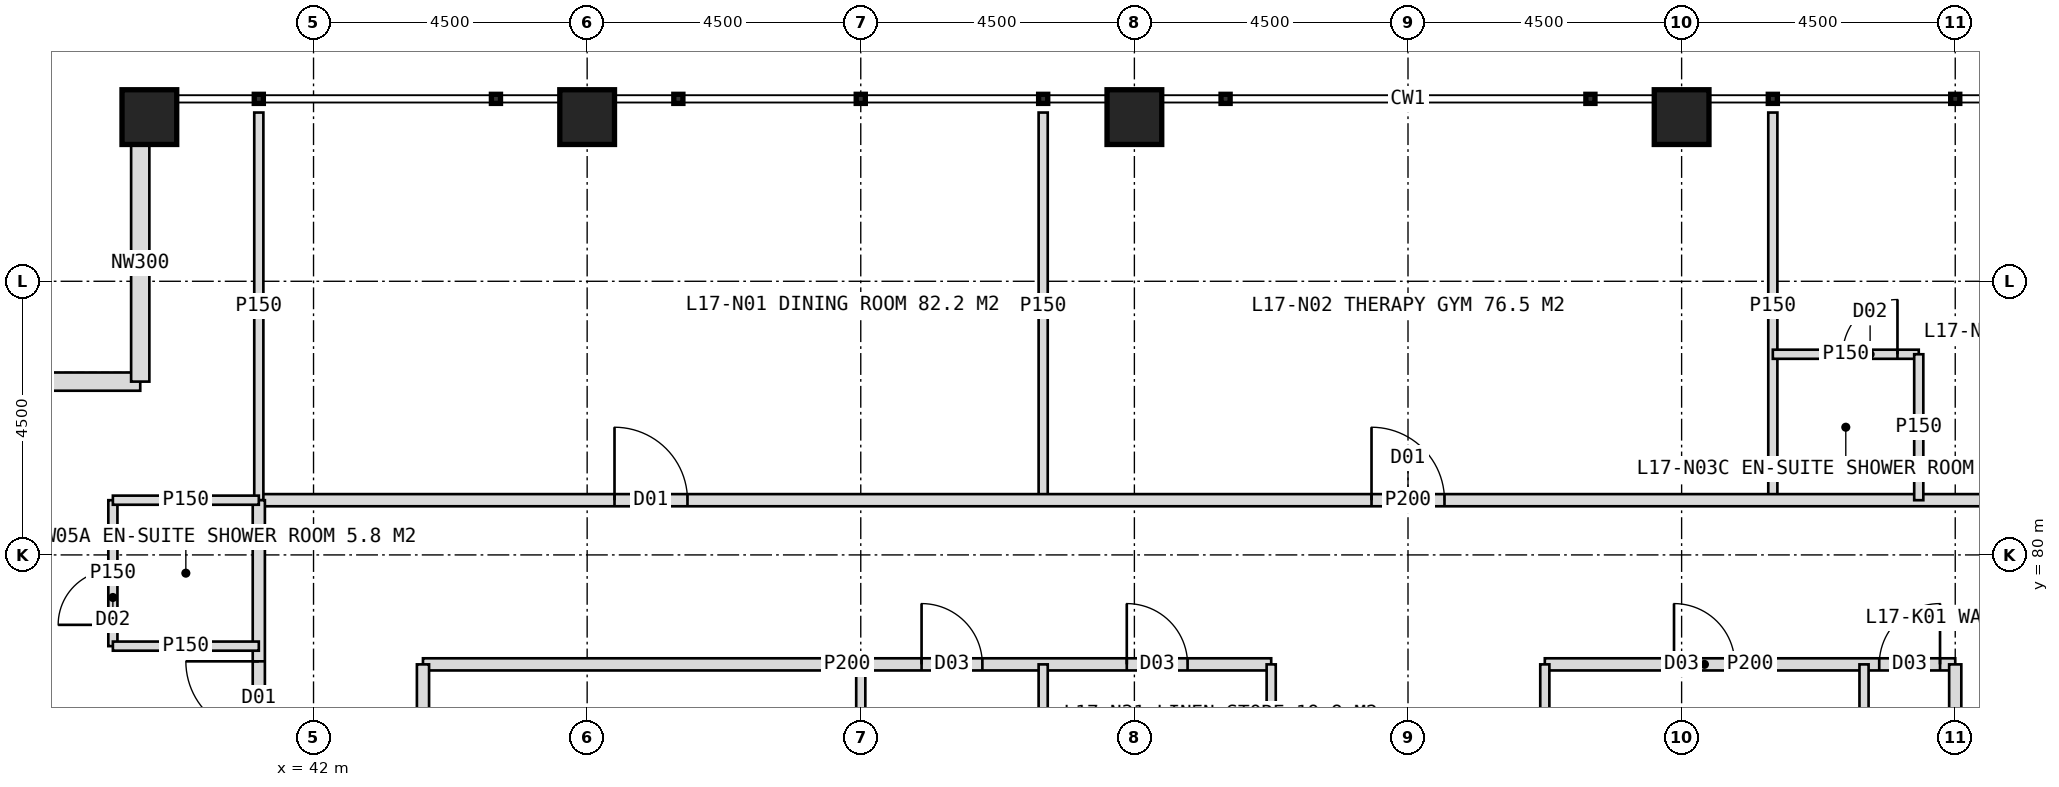
"""IFC4 building model, lengths in metres.
Left out: names, types, materials, properties, quantities, classifications, styles, units other than length and angle.
Written with IfcOpenShell. Run it as: python <this file> out.ifc"""

import sys

from ifc_helpers import new_model, si_unit, direction, frame, frame_2d, origin, origin_2d, place, context, subcontext, project, spatial, rectangle, hollow_rectangle, extrude, element, fill, save


model = new_model("IFC4")
c1 = context("Model", 3, precision=1e-05, world=origin(), true_north=direction((0.0, 1.0)))
c2 = subcontext(c1, "Body", "Model", "MODEL_VIEW")
j1 = project(units=[si_unit("LENGTHUNIT", "METRE"), si_unit("PLANEANGLEUNIT", "RADIAN")], contexts=[c1])
p1 = place(None, origin())
s1 = spatial("IfcSite", under=j1, at=p1, CompositionType="ELEMENT")
p2 = place(p1, origin())
s2 = spatial("IfcBuilding", under=s1, at=p2, CompositionType="ELEMENT")
p3 = place(p2, frame((0.0, 0.0, 75.0)))
s3 = spatial("IfcBuildingStorey", under=s2, at=p3, CompositionType="ELEMENT", Elevation=75.0)
for number, where, z_axis, x_axis in (
    (1, (39.3, 87.2, 0.0), (0.0, 0.0, 1.0), (1.0, 0.0, 0.0)),
    (2, (46.5, 87.2, 0.0), (0.0, 0.0, 1.0), (1.0, 0.0, 0.0)),
    (3, (55.5, 87.2, 0.0), (0.0, 0.0, 1.0), (1.0, 0.0, 0.0)),
    (4, (64.5, 87.2, 0.0), (0.0, 0.0, 1.0), (1.0, 0.0, 0.0)),
):
    element("IfcColumn", number, at=place(p3, frame(where, z_axis=z_axis, x_axis=x_axis)), inside=s3, PredefinedType="COLUMN", context=c2, shape_type="SweptSolid", body=[
        extrude(hollow_rectangle(XDim=0.9, YDim=0.9, WallThickness=0.08, at=origin_2d()), origin(), (0.0, 0.0, 1.0), 4.0),
    ])
for number, where, z_axis, x_axis in (
    (5, (35.25, 82.85, 0.0), (0.0, 0.0, 1.0), (1.0, 0.0, 0.0)),
    (6, (39.15, 82.85, 0.0), (0.0, 0.0, 1.0), (0.0, 1.0, 0.0)),
):
    element("IfcWall", number, at=place(p3, frame(where, z_axis=z_axis, x_axis=x_axis)), inside=s3, PredefinedType="ELEMENTEDWALL", context=c2, shape_type="SweptSolid", body=[
        extrude(rectangle(XDim=3.9, YDim=0.3, at=frame_2d((1.95, 0.0))), origin(), (0.0, 0.0, 1.0), 2.95),
    ])
for number, where, z_axis, x_axis in (
    (7, (54.0, 80.9, 0.0), (0.0, 0.0, 1.0), (0.0, 1.0, 0.0)),
    (8, (66.0, 80.9, 0.0), (0.0, 0.0, 1.0), (0.0, 1.0, 0.0)),
):
    element("IfcWall", number, at=place(p3, frame(where, z_axis=z_axis, x_axis=x_axis)), inside=s3, PredefinedType="PARTITIONING", context=c2, shape_type="SweptSolid", body=[
        extrude(rectangle(XDim=6.375, YDim=0.15, at=frame_2d((3.188, 0.0))), origin(), (0.0, 0.0, 1.0), 3.75),
    ])
p4 = place(p3, frame((41.1, 80.9, 0.0), z_axis=(0.0, 0.0, 1.0), x_axis=(1.0, 0.0, 0.0)))
e9 = element("IfcWall", 9, at=p4, inside=s3, PredefinedType="PARTITIONING", context=c2, shape_type="SweptSolid", body=[
    extrude(rectangle(XDim=37.8, YDim=0.2, at=frame_2d((18.9, 0.0))), origin(), (0.0, 0.0, 1.0), 3.75),
])
p5 = place(p4, frame((5.85, 0.0, 0.0)))
e10 = element("IfcOpeningElement", 10, at=p5, cuts=e9, PredefinedType="OPENING", context=c2, shape_type="SweptSolid", body=[
    extrude(rectangle(XDim=1.2, YDim=2.2, at=frame_2d((0.6, 1.1))), frame((0.0, 0.11, 0.0), z_axis=(0.0, -1.0, 0.0), x_axis=(1.0, 0.0, 0.0)), (0.0, 0.0, 1.0), 0.22),
])
p6 = place(p4, frame((18.3, 0.0, 0.0)))
e11 = element("IfcOpeningElement", 11, at=p6, cuts=e9, PredefinedType="OPENING", context=c2, shape_type="SweptSolid", body=[
    extrude(rectangle(XDim=1.2, YDim=2.2, at=frame_2d((0.6, 1.1))), frame((0.0, 0.11, 0.0), z_axis=(0.0, -1.0, 0.0), x_axis=(1.0, 0.0, 0.0)), (0.0, 0.0, 1.0), 0.22),
])
p7 = place(p4, frame((33.95, 0.0, 0.0)))
e12 = element("IfcOpeningElement", 12, at=p7, cuts=e9, PredefinedType="OPENING", context=c2, shape_type="SweptSolid", body=[
    extrude(rectangle(XDim=1.2, YDim=2.2, at=frame_2d((0.6, 1.1))), frame((0.0, 0.11, 0.0), z_axis=(0.0, -1.0, 0.0), x_axis=(1.0, 0.0, 0.0)), (0.0, 0.0, 1.0), 0.22),
])
p8 = place(p3, frame((41.1, 80.9, 0.0), z_axis=(0.0, 0.0, 1.0), x_axis=(0.0, 1.0, 0.0)))
e13 = element("IfcWall", 13, at=p8, inside=s3, PredefinedType="PARTITIONING", context=c2, shape_type="SweptSolid", body=[
    extrude(rectangle(XDim=6.375, YDim=0.15, at=frame_2d((3.188, 0.0))), origin(), (0.0, 0.0, 1.0), 3.75),
])
p9 = place(p3, frame((66.0, 83.3, 0.0), z_axis=(0.0, 0.0, 1.0), x_axis=(1.0, 0.0, 0.0)))
e14 = element("IfcWall", 14, at=p9, inside=s3, PredefinedType="PARTITIONING", context=c2, shape_type="SweptSolid", body=[
    extrude(rectangle(XDim=2.4, YDim=0.15, at=frame_2d((1.2, 0.0))), origin(), (0.0, 0.0, 1.0), 3.75),
])
p10 = place(p9, frame((1.15, 0.0, 0.0)))
e15 = element("IfcOpeningElement", 15, at=p10, cuts=e14, PredefinedType="OPENING", context=c2, shape_type="SweptSolid", body=[
    extrude(rectangle(XDim=0.9, YDim=2.1, at=frame_2d((0.45, 1.05))), frame((0.0, 0.085, 0.0), z_axis=(0.0, -1.0, 0.0), x_axis=(1.0, 0.0, 0.0)), (0.0, 0.0, 1.0), 0.17),
])
p11 = place(p3, frame((68.4, 80.9, 0.0), z_axis=(0.0, 0.0, 1.0), x_axis=(0.0, 1.0, 0.0)))
e16 = element("IfcWall", 16, at=p11, inside=s3, PredefinedType="PARTITIONING", context=c2, shape_type="SweptSolid", body=[
    extrude(rectangle(XDim=2.4, YDim=0.15, at=frame_2d((1.2, 0.0))), origin(), (0.0, 0.0, 1.0), 3.75),
])
p12 = place(p3, frame((51.0, 71.0, 0.0), z_axis=(0.0, 0.0, 1.0), x_axis=(0.0, 1.0, 0.0)))
e17 = element("IfcWall", 17, at=p12, inside=s3, PredefinedType="PARTITIONING", context=c2, shape_type="SweptSolid", body=[
    extrude(rectangle(XDim=7.2, YDim=0.15, at=frame_2d((3.6, 0.0))), origin(), (0.0, 0.0, 1.0), 3.75),
])
p13 = place(p3, frame((43.8, 78.2, 0.0), z_axis=(0.0, 0.0, 1.0), x_axis=(1.0, 0.0, 0.0)))
e18 = element("IfcWall", 18, at=p13, inside=s3, PredefinedType="PARTITIONING", context=c2, shape_type="SweptSolid", body=[
    extrude(rectangle(XDim=13.95, YDim=0.2, at=frame_2d((6.975, 0.0))), origin(), (0.0, 0.0, 1.0), 3.75),
])
p14 = place(p13, frame((8.2, 0.0, 0.0)))
e19 = element("IfcOpeningElement", 19, at=p14, cuts=e18, PredefinedType="OPENING", context=c2, shape_type="SweptSolid", body=[
    extrude(rectangle(XDim=1.0, YDim=2.1, at=frame_2d((0.5, 1.05))), frame((0.0, 0.11, 0.0), z_axis=(0.0, -1.0, 0.0), x_axis=(1.0, 0.0, 0.0)), (0.0, 0.0, 1.0), 0.22),
])
p15 = place(p13, frame((11.575, 0.0, 0.0)))
e20 = element("IfcOpeningElement", 20, at=p15, cuts=e18, PredefinedType="OPENING", context=c2, shape_type="SweptSolid", body=[
    extrude(rectangle(XDim=1.0, YDim=2.1, at=frame_2d((0.5, 1.05))), frame((0.0, 0.11, 0.0), z_axis=(0.0, -1.0, 0.0), x_axis=(1.0, 0.0, 0.0)), (0.0, 0.0, 1.0), 0.22),
])
p16 = place(p3, frame((62.25, 78.2, 0.0), z_axis=(0.0, 0.0, 1.0), x_axis=(1.0, 0.0, 0.0)))
e21 = element("IfcWall", 21, at=p16, inside=s3, PredefinedType="PARTITIONING", context=c2, shape_type="SweptSolid", body=[
    extrude(rectangle(XDim=6.75, YDim=0.2, at=frame_2d((3.375, 0.0))), origin(), (0.0, 0.0, 1.0), 3.75),
])
p17 = place(p16, frame((2.125, 0.0, 0.0)))
e22 = element("IfcOpeningElement", 22, at=p17, cuts=e21, PredefinedType="OPENING", context=c2, shape_type="SweptSolid", body=[
    extrude(rectangle(XDim=1.0, YDim=2.1, at=frame_2d((0.5, 1.05))), frame((0.0, 0.11, 0.0), z_axis=(0.0, -1.0, 0.0), x_axis=(1.0, 0.0, 0.0)), (0.0, 0.0, 1.0), 0.22),
])
p18 = place(p16, frame((5.5, 0.0, 0.0)))
e23 = element("IfcOpeningElement", 23, at=p18, cuts=e21, PredefinedType="OPENING", context=c2, shape_type="SweptSolid", body=[
    extrude(rectangle(XDim=1.0, YDim=2.1, at=frame_2d((0.5, 1.05))), frame((0.0, 0.11, 0.0), z_axis=(0.0, -1.0, 0.0), x_axis=(1.0, 0.0, 0.0)), (0.0, 0.0, 1.0), 0.22),
])
p19 = place(p3, frame((57.75, 71.0, 0.0), z_axis=(0.0, 0.0, 1.0), x_axis=(0.0, 1.0, 0.0)))
e24 = element("IfcWall", 24, at=p19, inside=s3, PredefinedType="PARTITIONING", context=c2, shape_type="SweptSolid", body=[
    extrude(rectangle(XDim=7.2, YDim=0.15, at=frame_2d((3.6, 0.0))), origin(), (0.0, 0.0, 1.0), 3.75),
])
p20 = place(p19, frame((0.6, 0.0, 0.0)))
e25 = element("IfcOpeningElement", 25, at=p20, cuts=e24, PredefinedType="OPENING", context=c2, shape_type="SweptSolid", body=[
    extrude(rectangle(XDim=0.9, YDim=2.1, at=frame_2d((0.45, 1.05))), frame((0.0, 0.085, 0.0), z_axis=(0.0, -1.0, 0.0), x_axis=(1.0, 0.0, 0.0)), (0.0, 0.0, 1.0), 0.17),
])
p21 = place(p3, frame((62.25, 71.0, 0.0), z_axis=(0.0, 0.0, 1.0), x_axis=(0.0, 1.0, 0.0)))
e26 = element("IfcWall", 26, at=p21, inside=s3, PredefinedType="PARTITIONING", context=c2, shape_type="SweptSolid", body=[
    extrude(rectangle(XDim=7.2, YDim=0.15, at=frame_2d((3.6, 0.0))), origin(), (0.0, 0.0, 1.0), 3.75),
])
p22 = place(p21, frame((0.6, 0.0, 0.0)))
e27 = element("IfcOpeningElement", 27, at=p22, cuts=e26, PredefinedType="OPENING", context=c2, shape_type="SweptSolid", body=[
    extrude(rectangle(XDim=0.9, YDim=2.1, at=frame_2d((0.45, 1.05))), frame((0.0, 0.085, 0.0), z_axis=(0.0, -1.0, 0.0), x_axis=(1.0, 0.0, 0.0)), (0.0, 0.0, 1.0), 0.17),
])
for number, where, z_axis, x_axis in (
    (28, (54.0, 71.0, 0.0), (0.0, 0.0, 1.0), (0.0, 1.0, 0.0)),
    (29, (67.5, 71.0, 0.0), (0.0, 0.0, 1.0), (0.0, 1.0, 0.0)),
):
    element("IfcWall", number, at=place(p3, frame(where, z_axis=z_axis, x_axis=x_axis)), inside=s3, PredefinedType="PARTITIONING", context=c2, shape_type="SweptSolid", body=[
        extrude(rectangle(XDim=7.2, YDim=0.15, at=frame_2d((3.6, 0.0))), origin(), (0.0, 0.0, 1.0), 3.75),
    ])
p23 = place(p3, frame((41.1, 43.1, 0.0), z_axis=(0.0, 0.0, 1.0), x_axis=(0.0, 1.0, 0.0)))
e30 = element("IfcWall", 30, at=p23, inside=s3, PredefinedType="PARTITIONING", context=c2, shape_type="SweptSolid", body=[
    extrude(rectangle(XDim=37.8, YDim=0.2, at=frame_2d((18.9, 0.0))), origin(), (0.0, 0.0, 1.0), 3.75),
])
p24 = place(p23, frame((2.45, 0.0, 0.0)))
e31 = element("IfcOpeningElement", 31, at=p24, cuts=e30, PredefinedType="OPENING", context=c2, shape_type="SweptSolid", body=[
    extrude(rectangle(XDim=1.2, YDim=2.2, at=frame_2d((0.6, 1.1))), frame((0.0, 0.11, 0.0), z_axis=(0.0, -1.0, 0.0), x_axis=(1.0, 0.0, 0.0)), (0.0, 0.0, 1.0), 0.22),
])
p25 = place(p23, frame((9.55, 0.0, 0.0)))
e32 = element("IfcOpeningElement", 32, at=p25, cuts=e30, PredefinedType="OPENING", context=c2, shape_type="SweptSolid", body=[
    extrude(rectangle(XDim=1.2, YDim=2.2, at=frame_2d((0.6, 1.1))), frame((0.0, 0.11, 0.0), z_axis=(0.0, -1.0, 0.0), x_axis=(1.0, 0.0, 0.0)), (0.0, 0.0, 1.0), 0.22),
])
p26 = place(p23, frame((15.05, 0.0, 0.0)))
e33 = element("IfcOpeningElement", 33, at=p26, cuts=e30, PredefinedType="OPENING", context=c2, shape_type="SweptSolid", body=[
    extrude(rectangle(XDim=1.2, YDim=2.2, at=frame_2d((0.6, 1.1))), frame((0.0, 0.11, 0.0), z_axis=(0.0, -1.0, 0.0), x_axis=(1.0, 0.0, 0.0)), (0.0, 0.0, 1.0), 0.22),
])
p27 = place(p23, frame((21.55, 0.0, 0.0)))
e34 = element("IfcOpeningElement", 34, at=p27, cuts=e30, PredefinedType="OPENING", context=c2, shape_type="SweptSolid", body=[
    extrude(rectangle(XDim=1.2, YDim=2.2, at=frame_2d((0.6, 1.1))), frame((0.0, 0.11, 0.0), z_axis=(0.0, -1.0, 0.0), x_axis=(1.0, 0.0, 0.0)), (0.0, 0.0, 1.0), 0.22),
])
p28 = place(p23, frame((33.95, 0.0, 0.0)))
e35 = element("IfcOpeningElement", 35, at=p28, cuts=e30, PredefinedType="OPENING", context=c2, shape_type="SweptSolid", body=[
    extrude(rectangle(XDim=1.2, YDim=2.2, at=frame_2d((0.6, 1.1))), frame((0.0, 0.11, 0.0), z_axis=(0.0, -1.0, 0.0), x_axis=(1.0, 0.0, 0.0)), (0.0, 0.0, 1.0), 0.22),
])
p29 = place(p3, frame((38.7, 78.5, 0.0), z_axis=(0.0, 0.0, 1.0), x_axis=(0.0, 1.0, 0.0)))
e36 = element("IfcWall", 36, at=p29, inside=s3, PredefinedType="PARTITIONING", context=c2, shape_type="SweptSolid", body=[
    extrude(rectangle(XDim=2.4, YDim=0.15, at=frame_2d((1.2, 0.0))), origin(), (0.0, 0.0, 1.0), 3.75),
])
p30 = place(p29, frame((0.35, 0.0, 0.0)))
e37 = element("IfcOpeningElement", 37, at=p30, cuts=e36, PredefinedType="OPENING", context=c2, shape_type="SweptSolid", body=[
    extrude(rectangle(XDim=0.9, YDim=2.1, at=frame_2d((0.45, 1.05))), frame((0.0, 0.085, 0.0), z_axis=(0.0, -1.0, 0.0), x_axis=(1.0, 0.0, 0.0)), (0.0, 0.0, 1.0), 0.17),
])
for number, where, z_axis, x_axis in (
    (38, (41.1, 78.5, 0.0), (0.0, 0.0, 1.0), (-1.0, 0.0, 0.0)),
    (39, (41.1, 80.9, 0.0), (0.0, 0.0, 1.0), (-1.0, 0.0, 0.0)),
):
    element("IfcWall", number, at=place(p3, frame(where, z_axis=z_axis, x_axis=x_axis)), inside=s3, PredefinedType="PARTITIONING", context=c2, shape_type="SweptSolid", body=[
        extrude(rectangle(XDim=2.4, YDim=0.15, at=frame_2d((1.2, 0.0))), origin(), (0.0, 0.0, 1.0), 3.75),
    ])
p31 = place(p3, frame((43.8, 62.0, 0.0), z_axis=(0.0, 0.0, 1.0), x_axis=(0.0, 1.0, 0.0)))
e40 = element("IfcWall", 40, at=p31, inside=s3, PredefinedType="PARTITIONING", context=c2, shape_type="SweptSolid", body=[
    extrude(rectangle(XDim=16.2, YDim=0.2, at=frame_2d((8.1, 0.0))), origin(), (0.0, 0.0, 1.0), 3.75),
])
p32 = place(p31, frame((3.25, 0.0, 0.0)))
e41 = element("IfcOpeningElement", 41, at=p32, cuts=e40, PredefinedType="OPENING", context=c2, shape_type="SweptSolid", body=[
    extrude(rectangle(XDim=1.0, YDim=2.1, at=frame_2d((0.5, 1.05))), frame((0.0, 0.11, 0.0), z_axis=(0.0, -1.0, 0.0), x_axis=(1.0, 0.0, 0.0)), (0.0, 0.0, 1.0), 0.22),
])
p33 = place(p31, frame((9.25, 0.0, 0.0)))
e42 = element("IfcOpeningElement", 42, at=p33, cuts=e40, PredefinedType="OPENING", context=c2, shape_type="SweptSolid", body=[
    extrude(rectangle(XDim=1.0, YDim=2.1, at=frame_2d((0.5, 1.05))), frame((0.0, 0.11, 0.0), z_axis=(0.0, -1.0, 0.0), x_axis=(1.0, 0.0, 0.0)), (0.0, 0.0, 1.0), 0.22),
])
p34 = place(p31, frame((13.6, 0.0, 0.0)))
e43 = element("IfcOpeningElement", 43, at=p34, cuts=e40, PredefinedType="OPENING", context=c2, shape_type="SweptSolid", body=[
    extrude(rectangle(XDim=1.0, YDim=2.1, at=frame_2d((0.5, 1.05))), frame((0.0, 0.11, 0.0), z_axis=(0.0, -1.0, 0.0), x_axis=(1.0, 0.0, 0.0)), (0.0, 0.0, 1.0), 0.22),
])
p35 = place(p3, frame((69.0, 75.1, 0.0), z_axis=(0.0, 0.0, 1.0), x_axis=(0.0, 1.0, 0.0)))
e44 = element("IfcWall", 44, at=p35, inside=s3, PredefinedType="PARTITIONING", context=c2, shape_type="SweptSolid", body=[
    extrude(rectangle(XDim=3.1, YDim=0.2, at=frame_2d((1.55, 0.0))), origin(), (0.0, 0.0, 1.0), 3.75),
])
p36 = place(p5, origin())
e45 = element("IfcDoor", 45, at=p36, inside=s3, OperationType="SINGLE_SWING_LEFT", PredefinedType="DOOR", context=c2, shape_type="SweptSolid", body=[
    extrude(rectangle(XDim=1.2, YDim=2.2, at=frame_2d((0.6, 1.1))), frame((0.0, 0.025, 0.0), z_axis=(0.0, -1.0, 0.0), x_axis=(1.0, 0.0, 0.0)), (0.0, 0.0, 1.0), 0.05),
])
fill(e10, e45)
p37 = place(p6, origin())
e46 = element("IfcDoor", 46, at=p37, inside=s3, OperationType="SINGLE_SWING_LEFT", PredefinedType="DOOR", context=c2, shape_type="SweptSolid", body=[
    extrude(rectangle(XDim=1.2, YDim=2.2, at=frame_2d((0.6, 1.1))), frame((0.0, 0.025, 0.0), z_axis=(0.0, -1.0, 0.0), x_axis=(1.0, 0.0, 0.0)), (0.0, 0.0, 1.0), 0.05),
])
fill(e11, e46)
p38 = place(p10, origin())
e47 = element("IfcDoor", 47, at=p38, inside=s3, OperationType="SINGLE_SWING_RIGHT", PredefinedType="DOOR", context=c2, shape_type="SweptSolid", body=[
    extrude(rectangle(XDim=0.9, YDim=2.1, at=frame_2d((0.45, 1.05))), frame((0.0, 0.025, 0.0), z_axis=(0.0, -1.0, 0.0), x_axis=(1.0, 0.0, 0.0)), (0.0, 0.0, 1.0), 0.05),
])
fill(e15, e47)
p39 = place(p14, origin())
e48 = element("IfcDoor", 48, at=p39, inside=s3, OperationType="SINGLE_SWING_LEFT", PredefinedType="DOOR", context=c2, shape_type="SweptSolid", body=[
    extrude(rectangle(XDim=1.0, YDim=2.1, at=frame_2d((0.5, 1.05))), frame((0.0, 0.025, 0.0), z_axis=(0.0, -1.0, 0.0), x_axis=(1.0, 0.0, 0.0)), (0.0, 0.0, 1.0), 0.05),
])
fill(e19, e48)
p40 = place(p15, origin())
e49 = element("IfcDoor", 49, at=p40, inside=s3, OperationType="SINGLE_SWING_LEFT", PredefinedType="DOOR", context=c2, shape_type="SweptSolid", body=[
    extrude(rectangle(XDim=1.0, YDim=2.1, at=frame_2d((0.5, 1.05))), frame((0.0, 0.025, 0.0), z_axis=(0.0, -1.0, 0.0), x_axis=(1.0, 0.0, 0.0)), (0.0, 0.0, 1.0), 0.05),
])
fill(e20, e49)
p41 = place(p17, origin())
e50 = element("IfcDoor", 50, at=p41, inside=s3, OperationType="SINGLE_SWING_LEFT", PredefinedType="DOOR", context=c2, shape_type="SweptSolid", body=[
    extrude(rectangle(XDim=1.0, YDim=2.1, at=frame_2d((0.5, 1.05))), frame((0.0, 0.025, 0.0), z_axis=(0.0, -1.0, 0.0), x_axis=(1.0, 0.0, 0.0)), (0.0, 0.0, 1.0), 0.05),
])
fill(e22, e50)
p42 = place(p18, origin())
e51 = element("IfcDoor", 51, at=p42, inside=s3, OperationType="SINGLE_SWING_RIGHT", PredefinedType="DOOR", context=c2, shape_type="SweptSolid", body=[
    extrude(rectangle(XDim=1.0, YDim=2.1, at=frame_2d((0.5, 1.05))), frame((0.0, 0.025, 0.0), z_axis=(0.0, -1.0, 0.0), x_axis=(1.0, 0.0, 0.0)), (0.0, 0.0, 1.0), 0.05),
])
fill(e23, e51)
p43 = place(p28, origin())
e52 = element("IfcDoor", 52, at=p43, inside=s3, OperationType="SINGLE_SWING_RIGHT", PredefinedType="DOOR", context=c2, shape_type="SweptSolid", body=[
    extrude(rectangle(XDim=1.2, YDim=2.2, at=frame_2d((0.6, 1.1))), frame((0.0, 0.025, 0.0), z_axis=(0.0, -1.0, 0.0), x_axis=(1.0, 0.0, 0.0)), (0.0, 0.0, 1.0), 0.05),
])
fill(e35, e52)
p44 = place(p30, origin())
e53 = element("IfcDoor", 53, at=p44, inside=s3, OperationType="SINGLE_SWING_LEFT", PredefinedType="DOOR", context=c2, shape_type="SweptSolid", body=[
    extrude(rectangle(XDim=0.9, YDim=2.1, at=frame_2d((0.45, 1.05))), frame((0.0, 0.025, 0.0), z_axis=(0.0, -1.0, 0.0), x_axis=(1.0, 0.0, 0.0)), (0.0, 0.0, 1.0), 0.05),
])
fill(e37, e53)
save(model, sys.argv[1])
